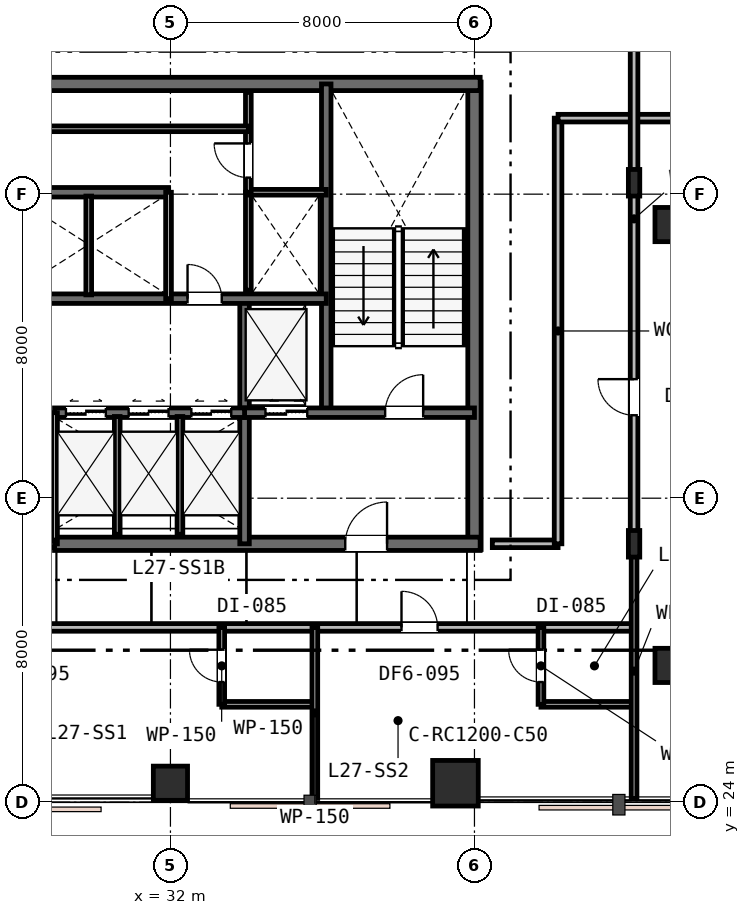
"""IFC4 building model, lengths in metres.
Left out: names, types, materials, properties, quantities, classifications, styles, units other than length and angle.
Written with IfcOpenShell. Run it as: python <this file> out.ifc"""

import sys

from ifc_helpers import new_model, si_unit, direction, frame, frame_2d, origin, origin_2d, place, context, subcontext, project, spatial, rectangle, i_section, extrude, element, fill, save


model = new_model("IFC4")
c1 = context("Model", 3, precision=1e-05, world=origin(), true_north=direction((0.0, 1.0)))
c2 = subcontext(c1, "Body", "Model", "MODEL_VIEW")
j1 = project(units=[si_unit("LENGTHUNIT", "METRE"), si_unit("PLANEANGLEUNIT", "RADIAN")], contexts=[c1])
p1 = place(None, origin())
s1 = spatial("IfcSite", under=j1, at=p1, CompositionType="ELEMENT")
p2 = place(p1, origin())
s2 = spatial("IfcBuilding", under=s1, at=p2, CompositionType="ELEMENT")
p3 = place(p2, frame((0.0, 0.0, 108.0)))
s3 = spatial("IfcBuildingStorey", under=s2, at=p3, CompositionType="ELEMENT", Elevation=108.0)
p4 = place(p3, frame((40.0, 30.65, 0.0), z_axis=(0.0, 0.0, 1.0), x_axis=(0.0, 1.0, 0.0)))
e1 = element("IfcWall", 1, at=p4, inside=s3, PredefinedType="SHEAR", context=c2, shape_type="SweptSolid", body=[
    extrude(rectangle(XDim=12.3, YDim=0.35, at=frame_2d((6.15, 0.0))), origin(), (0.0, 0.0, 1.0), 3.6),
])
p5 = place(p3, frame((15.85, 42.9, 0.0), z_axis=(0.0, 0.0, 1.0), x_axis=(1.0, 0.0, 0.0)))
e2 = element("IfcWall", 2, at=p5, inside=s3, PredefinedType="SHEAR", context=c2, shape_type="SweptSolid", body=[
    extrude(rectangle(XDim=24.3, YDim=0.35, at=frame_2d((12.15, 0.0))), origin(), (0.0, 0.0, 1.0), 3.6),
])
p6 = place(p3, frame((28.95, 30.8, 0.0), z_axis=(0.0, 0.0, 1.0), x_axis=(1.0, 0.0, 0.0)))
e3 = element("IfcWall", 3, at=p6, inside=s3, PredefinedType="SHEAR", context=c2, shape_type="SweptSolid", body=[
    extrude(rectangle(XDim=11.2, YDim=0.35, at=frame_2d((5.6, 0.0))), origin(), (0.0, 0.0, 1.0), 3.6),
])
p7 = place(p6, frame((7.65, 0.0, 0.0)))
e4 = element("IfcOpeningElement", 4, at=p7, cuts=e3, PredefinedType="OPENING", context=c2, shape_type="SweptSolid", body=[
    extrude(rectangle(XDim=1.1, YDim=2.15, at=frame_2d((0.55, 1.075))), frame((0.0, 0.185, 0.0), z_axis=(0.0, -1.0, 0.0), x_axis=(1.0, 0.0, 0.0)), (0.0, 0.0, 1.0), 0.37),
])
p8 = place(p3, frame((36.1, 34.25, 0.0), z_axis=(0.0, 0.0, 1.0), x_axis=(0.0, 1.0, 0.0)))
e5 = element("IfcWall", 5, at=p8, inside=s3, PredefinedType="SHEAR", context=c2, shape_type="SweptSolid", body=[
    extrude(rectangle(XDim=8.65, YDim=0.25, at=frame_2d((4.325, 0.0))), origin(), (0.0, 0.0, 1.0), 3.6),
])
p9 = place(p3, frame((33.95, 30.8, 0.0), z_axis=(0.0, 0.0, 1.0), x_axis=(0.0, 1.0, 0.0)))
e6 = element("IfcWall", 6, at=p9, inside=s3, PredefinedType="SHEAR", context=c2, shape_type="SweptSolid", body=[
    extrude(rectangle(XDim=6.45, YDim=0.25, at=frame_2d((3.225, 0.0))), origin(), (0.0, 0.0, 1.0), 3.6),
])
p10 = place(p3, frame((33.95, 34.25, 0.0), z_axis=(0.0, 0.0, 1.0), x_axis=(1.0, 0.0, 0.0)))
e7 = element("IfcWall", 7, at=p10, inside=s3, PredefinedType="SHEAR", context=c2, shape_type="SweptSolid", body=[
    extrude(rectangle(XDim=6.05, YDim=0.25, at=frame_2d((3.025, 0.0))), origin(), (0.0, 0.0, 1.0), 3.6),
])
p11 = place(p10, frame((3.7, 0.0, 0.0)))
e8 = element("IfcOpeningElement", 8, at=p11, cuts=e7, PredefinedType="OPENING", context=c2, shape_type="SweptSolid", body=[
    extrude(rectangle(XDim=1.0, YDim=2.15, at=frame_2d((0.5, 1.075))), frame((0.0, 0.135, 0.0), z_axis=(0.0, -1.0, 0.0), x_axis=(1.0, 0.0, 0.0)), (0.0, 0.0, 1.0), 0.27),
])
p12 = place(p10, frame((0.55, 0.0, 0.0)))
e9 = element("IfcOpeningElement", 9, at=p12, cuts=e7, PredefinedType="OPENING", context=c2, shape_type="SweptSolid", body=[
    extrude(rectangle(XDim=1.1, YDim=2.15, at=frame_2d((0.55, 1.075))), frame((0.0, 0.135, 0.0), z_axis=(0.0, -1.0, 0.0), x_axis=(1.0, 0.0, 0.0)), (0.0, 0.0, 1.0), 0.27),
])
p13 = place(p3, frame((28.95, 34.25, 0.0), z_axis=(0.0, 0.0, 1.0), x_axis=(1.0, 0.0, 0.0)))
e10 = element("IfcWall", 10, at=p13, inside=s3, PredefinedType="SHEAR", context=c2, shape_type="SweptSolid", body=[
    extrude(rectangle(XDim=5.0, YDim=0.25, at=frame_2d((2.5, 0.0))), origin(), (0.0, 0.0, 1.0), 3.6),
])
p14 = place(p13, frame((0.3, 0.0, 0.0)))
e11 = element("IfcOpeningElement", 11, at=p14, cuts=e10, PredefinedType="OPENING", context=c2, shape_type="SweptSolid", body=[
    extrude(rectangle(XDim=1.05, YDim=2.15, at=frame_2d((0.525, 1.075))), frame((0.0, 0.135, 0.0), z_axis=(0.0, -1.0, 0.0), x_axis=(1.0, 0.0, 0.0)), (0.0, 0.0, 1.0), 0.27),
])
p15 = place(p13, frame((1.95, 0.0, 0.0)))
e12 = element("IfcOpeningElement", 12, at=p15, cuts=e10, PredefinedType="OPENING", context=c2, shape_type="SweptSolid", body=[
    extrude(rectangle(XDim=1.05, YDim=2.15, at=frame_2d((0.525, 1.075))), frame((0.0, 0.135, 0.0), z_axis=(0.0, -1.0, 0.0), x_axis=(1.0, 0.0, 0.0)), (0.0, 0.0, 1.0), 0.27),
])
p16 = place(p13, frame((3.6, 0.0, 0.0)))
e13 = element("IfcOpeningElement", 13, at=p16, cuts=e10, PredefinedType="OPENING", context=c2, shape_type="SweptSolid", body=[
    extrude(rectangle(XDim=1.05, YDim=2.15, at=frame_2d((0.525, 1.075))), frame((0.0, 0.135, 0.0), z_axis=(0.0, -1.0, 0.0), x_axis=(1.0, 0.0, 0.0)), (0.0, 0.0, 1.0), 0.27),
])
p17 = place(p3, frame((19.9, 37.25, 0.0), z_axis=(0.0, 0.0, 1.0), x_axis=(1.0, 0.0, 0.0)))
e14 = element("IfcWall", 14, at=p17, inside=s3, PredefinedType="SHEAR", context=c2, shape_type="SweptSolid", body=[
    extrude(rectangle(XDim=16.2, YDim=0.25, at=frame_2d((8.1, 0.0))), origin(), (0.0, 0.0, 1.0), 3.6),
])
p18 = place(p17, frame((12.55, 0.0, 0.0)))
e15 = element("IfcOpeningElement", 15, at=p18, cuts=e14, PredefinedType="OPENING", context=c2, shape_type="SweptSolid", body=[
    extrude(rectangle(XDim=0.9, YDim=2.15, at=frame_2d((0.45, 1.075))), frame((0.0, 0.135, 0.0), z_axis=(0.0, -1.0, 0.0), x_axis=(1.0, 0.0, 0.0)), (0.0, 0.0, 1.0), 0.27),
])
p19 = place(p3, frame((19.9, 40.05, 0.0), z_axis=(0.0, 0.0, 1.0), x_axis=(1.0, 0.0, 0.0)))
e16 = element("IfcWall", 16, at=p19, inside=s3, PredefinedType="SHEAR", context=c2, shape_type="SweptSolid", body=[
    extrude(rectangle(XDim=12.05, YDim=0.25, at=frame_2d((6.025, 0.0))), origin(), (0.0, 0.0, 1.0), 3.6),
])
p20 = place(p3, frame((32.0, 24.5, 0.0), z_axis=(0.0, 0.0, 1.0), x_axis=(1.0, 0.0, 0.0)))
e17 = element("IfcColumn", 17, at=p20, inside=s3, PredefinedType="COLUMN", context=c2, shape_type="SweptSolid", body=[
    extrude(rectangle(XDim=0.9, YDim=0.9, at=origin_2d()), origin(), (0.0, 0.0, 1.0), 3.6),
])
p21 = place(p3, frame((39.5, 24.5, 0.0), z_axis=(0.0, 0.0, 1.0), x_axis=(1.0, 0.0, 0.0)))
e18 = element("IfcColumn", 18, at=p21, inside=s3, PredefinedType="COLUMN", context=c2, shape_type="SweptSolid", body=[
    extrude(rectangle(XDim=1.2, YDim=1.2, at=origin_2d()), origin(), (0.0, 0.0, 1.0), 3.6),
])
for number, where, z_axis, x_axis in (
    (19, (45.2, 27.6, 0.0), (0.0, 0.0, 1.0), (1.0, 0.0, 0.0)),
    (20, (45.2, 39.2, 0.0), (0.0, 0.0, 1.0), (1.0, 0.0, 0.0)),
):
    element("IfcColumn", number, at=place(p3, frame(where, z_axis=z_axis, x_axis=x_axis)), inside=s3, PredefinedType="COLUMN", context=c2, shape_type="SweptSolid", body=[
        extrude(rectangle(XDim=0.9, YDim=0.9, at=origin_2d()), origin(), (0.0, 0.0, 1.0), 3.6),
    ])
for number, where, z_axis, x_axis in (
    (21, (44.2, 30.8, 0.0), (0.0, 0.0, 1.0), (1.0, 0.0, 0.0)),
    (22, (44.2, 40.3, 0.0), (0.0, 0.0, 1.0), (1.0, 0.0, 0.0)),
):
    element("IfcColumn", number, at=place(p3, frame(where, z_axis=z_axis, x_axis=x_axis)), inside=s3, PredefinedType="COLUMN", context=c2, shape_type="SweptSolid", body=[
        extrude(i_section(OverallWidth=0.3, OverallDepth=0.7, WebThickness=0.017, FlangeThickness=0.032, FilletRadius=0.027, at=origin_2d()), origin(), (0.0, 0.0, 1.0), 3.6),
    ])
p22 = place(p3, frame((28.95, 30.8, 0.0), z_axis=(0.0, 0.0, 1.0), x_axis=(0.0, 1.0, 0.0)))
e23 = element("IfcWall", 23, at=p22, inside=s3, PredefinedType="PLUMBINGWALL", context=c2, shape_type="SweptSolid", body=[
    extrude(rectangle(XDim=3.45, YDim=0.15, at=frame_2d((1.725, 0.0))), origin(), (0.0, 0.0, 1.0), 3.33),
])
p23 = place(p3, frame((27.05, 30.8, 0.0), z_axis=(0.0, 0.0, 1.0), x_axis=(1.0, 0.0, 0.0)))
e24 = element("IfcWall", 24, at=p23, inside=s3, PredefinedType="PARTITIONING", context=c2, shape_type="SweptSolid", body=[
    extrude(rectangle(XDim=1.9, YDim=0.2, at=frame_2d((0.95, 0.0))), origin(), (0.0, 0.0, 1.0), 3.01),
])
p24 = place(p23, frame((0.4, 0.0, 0.0)))
e25 = element("IfcOpeningElement", 25, at=p24, cuts=e24, PredefinedType="OPENING", context=c2, shape_type="SweptSolid", body=[
    extrude(rectangle(XDim=1.1, YDim=2.15, at=frame_2d((0.55, 1.075))), frame((0.0, 0.11, 0.0), z_axis=(0.0, -1.0, 0.0), x_axis=(1.0, 0.0, 0.0)), (0.0, 0.0, 1.0), 0.22),
])
for number, where, z_axis, x_axis in (
    (26, (30.6, 31.05, 0.0), (0.0, 0.0, 1.0), (0.0, 1.0, 0.0)),
    (27, (32.25, 31.05, 0.0), (0.0, 0.0, 1.0), (0.0, 1.0, 0.0)),
):
    element("IfcWall", number, at=place(p3, frame(where, z_axis=z_axis, x_axis=x_axis)), inside=s3, PredefinedType="PLUMBINGWALL", context=c2, shape_type="SweptSolid", body=[
        extrude(rectangle(XDim=3.1, YDim=0.15, at=frame_2d((1.55, 0.0))), origin(), (0.0, 0.0, 1.0), 3.33),
    ])
p25 = place(p3, frame((31.95, 37.25, 0.0), z_axis=(0.0, 0.0, 1.0), x_axis=(0.0, 1.0, 0.0)))
e28 = element("IfcWall", 28, at=p25, inside=s3, PredefinedType="PLUMBINGWALL", context=c2, shape_type="SweptSolid", body=[
    extrude(rectangle(XDim=2.8, YDim=0.15, at=frame_2d((1.4, 0.0))), origin(), (0.0, 0.0, 1.0), 3.33),
])
p26 = place(p3, frame((29.85, 37.35, 0.0), z_axis=(0.0, 0.0, 1.0), x_axis=(0.0, 1.0, 0.0)))
e29 = element("IfcWall", 29, at=p26, inside=s3, PredefinedType="PLUMBINGWALL", context=c2, shape_type="SweptSolid", body=[
    extrude(rectangle(XDim=2.6, YDim=0.15, at=frame_2d((1.3, 0.0))), origin(), (0.0, 0.0, 1.0), 3.33),
])
p27 = place(p3, frame((34.05, 37.473, 0.0), z_axis=(0.0, 0.0, 1.0), x_axis=(0.0, 1.0, 0.0)))
e30 = element("IfcWall", 30, at=p27, inside=s3, PredefinedType="PLUMBINGWALL", context=c2, shape_type="SweptSolid", body=[
    extrude(rectangle(XDim=2.577, YDim=0.15, at=frame_2d((1.288, 0.0))), origin(), (0.0, 0.0, 1.0), 3.33),
])
p28 = place(p3, frame((34.05, 40.05, 0.0), z_axis=(0.0, 0.0, 1.0), x_axis=(1.0, 0.0, 0.0)))
e31 = element("IfcWall", 31, at=p28, inside=s3, PredefinedType="PARTITIONING", context=c2, shape_type="SweptSolid", body=[
    extrude(rectangle(XDim=2.05, YDim=0.15, at=frame_2d((1.025, 0.0))), origin(), (0.0, 0.0, 1.0), 3.33),
])
p29 = place(p3, frame((34.05, 40.05, 0.0), z_axis=(0.0, 0.0, 1.0), x_axis=(0.0, 1.0, 0.0)))
e32 = element("IfcWall", 32, at=p29, inside=s3, PredefinedType="PARTITIONING", context=c2, shape_type="SweptSolid", body=[
    extrude(rectangle(XDim=2.63, YDim=0.15, at=frame_2d((1.315, 0.0))), origin(), (0.0, 0.0, 1.0), 3.33),
])
p30 = place(p29, frame((0.385, 0.0, 0.0)))
e33 = element("IfcOpeningElement", 33, at=p30, cuts=e32, PredefinedType="OPENING", context=c2, shape_type="SweptSolid", body=[
    extrude(rectangle(XDim=0.9, YDim=2.15, at=frame_2d((0.45, 1.075))), frame((0.0, 0.085, 0.0), z_axis=(0.0, -1.0, 0.0), x_axis=(1.0, 0.0, 0.0)), (0.0, 0.0, 1.0), 0.17),
])
p31 = place(p3, frame((22.08, 41.72, 0.0), z_axis=(0.0, 0.0, 1.0), x_axis=(1.0, 0.0, 0.0)))
e34 = element("IfcWall", 34, at=p31, inside=s3, PredefinedType="PARTITIONING", context=c2, shape_type="SweptSolid", body=[
    extrude(rectangle(XDim=11.97, YDim=0.15, at=frame_2d((5.985, 0.0))), origin(), (0.0, 0.0, 1.0), 3.33),
])
p32 = place(p31, frame((5.535, 0.0, 0.0)))
e35 = element("IfcOpeningElement", 35, at=p32, cuts=e34, PredefinedType="OPENING", context=c2, shape_type="SweptSolid", body=[
    extrude(rectangle(XDim=0.9, YDim=2.15, at=frame_2d((0.45, 1.075))), frame((0.0, 0.085, 0.0), z_axis=(0.0, -1.0, 0.0), x_axis=(1.0, 0.0, 0.0)), (0.0, 0.0, 1.0), 0.17),
])
p33 = place(p3, frame((15.4, 28.6, 0.0), z_axis=(0.0, 0.0, 1.0), x_axis=(1.0, 0.0, 0.0)))
e36 = element("IfcWall", 36, at=p33, inside=s3, PredefinedType="PARTITIONING", context=c2, shape_type="SweptSolid", body=[
    extrude(rectangle(XDim=28.8, YDim=0.2, at=frame_2d((14.4, 0.0))), origin(), (0.0, 0.0, 1.0), 2.87),
])
p34 = place(p33, frame((12.41, 0.0, 0.0)))
e37 = element("IfcOpeningElement", 37, at=p34, cuts=e36, PredefinedType="OPENING", context=c2, shape_type="SweptSolid", body=[
    extrude(rectangle(XDim=0.95, YDim=2.15, at=frame_2d((0.475, 1.075))), frame((0.0, 0.11, 0.0), z_axis=(0.0, -1.0, 0.0), x_axis=(1.0, 0.0, 0.0)), (0.0, 0.0, 1.0), 0.22),
])
p35 = place(p33, frame((22.68, 0.0, 0.0)))
e38 = element("IfcOpeningElement", 38, at=p35, cuts=e36, PredefinedType="OPENING", context=c2, shape_type="SweptSolid", body=[
    extrude(rectangle(XDim=0.95, YDim=2.15, at=frame_2d((0.475, 1.075))), frame((0.0, 0.11, 0.0), z_axis=(0.0, -1.0, 0.0), x_axis=(1.0, 0.0, 0.0)), (0.0, 0.0, 1.0), 0.22),
])
p36 = place(p3, frame((40.47, 30.8, 0.0), z_axis=(0.0, 0.0, 1.0), x_axis=(1.0, 0.0, 0.0)))
e39 = element("IfcWall", 39, at=p36, inside=s3, PredefinedType="PARTITIONING", context=c2, shape_type="SweptSolid", body=[
    extrude(rectangle(XDim=1.73, YDim=0.2, at=frame_2d((0.865, 0.0))), origin(), (0.0, 0.0, 1.0), 2.87),
])
p37 = place(p3, frame((42.2, 30.8, 0.0), z_axis=(0.0, 0.0, 1.0), x_axis=(0.0, 1.0, 0.0)))
e40 = element("IfcWall", 40, at=p37, inside=s3, PredefinedType="PARTITIONING", context=c2, shape_type="SweptSolid", body=[
    extrude(rectangle(XDim=11.2, YDim=0.2, at=frame_2d((5.6, 0.0))), origin(), (0.0, 0.0, 1.0), 2.87),
])
p38 = place(p3, frame((42.2, 42.0, 0.0), z_axis=(0.0, 0.0, 1.0), x_axis=(1.0, 0.0, 0.0)))
e41 = element("IfcWall", 41, at=p38, inside=s3, PredefinedType="PARTITIONING", context=c2, shape_type="SweptSolid", body=[
    extrude(rectangle(XDim=8.7, YDim=0.2, at=frame_2d((4.35, 0.0))), origin(), (0.0, 0.0, 1.0), 3.33),
])
p39 = place(p3, frame((33.35, 26.576, 0.0), z_axis=(0.0, 0.0, 1.0), x_axis=(1.0, 0.0, 0.0)))
e42 = element("IfcWall", 42, at=p39, inside=s3, PredefinedType="PARTITIONING", context=c2, shape_type="SweptSolid", body=[
    extrude(rectangle(XDim=2.45, YDim=0.15, at=frame_2d((1.225, 0.0))), origin(), (0.0, 0.0, 1.0), 3.01),
])
p40 = place(p3, frame((33.35, 26.576, 0.0), z_axis=(0.0, 0.0, 1.0), x_axis=(0.0, 1.0, 0.0)))
e43 = element("IfcWall", 43, at=p40, inside=s3, PredefinedType="PARTITIONING", context=c2, shape_type="SweptSolid", body=[
    extrude(rectangle(XDim=2.024, YDim=0.15, at=frame_2d((1.012, 0.0))), origin(), (0.0, 0.0, 1.0), 3.33),
])
p41 = place(p40, frame((0.587, 0.0, 0.0)))
e44 = element("IfcOpeningElement", 44, at=p41, cuts=e43, PredefinedType="OPENING", context=c2, shape_type="SweptSolid", body=[
    extrude(rectangle(XDim=0.85, YDim=2.15, at=frame_2d((0.425, 1.075))), frame((0.0, 0.085, 0.0), z_axis=(0.0, -1.0, 0.0), x_axis=(1.0, 0.0, 0.0)), (0.0, 0.0, 1.0), 0.17),
])
p42 = place(p3, frame((35.8, 28.6, 0.0), z_axis=(0.0, 0.0, 1.0), x_axis=(0.0, -1.0, 0.0)))
e45 = element("IfcWall", 45, at=p42, inside=s3, PredefinedType="PARTITIONING", context=c2, shape_type="SweptSolid", body=[
    extrude(rectangle(XDim=4.5, YDim=0.15, at=frame_2d((2.25, 0.0))), origin(), (0.0, 0.0, 1.0), 2.96),
])
p43 = place(p3, frame((41.75, 26.576, 0.0), z_axis=(0.0, 0.0, 1.0), x_axis=(1.0, 0.0, 0.0)))
e46 = element("IfcWall", 46, at=p43, inside=s3, PredefinedType="PARTITIONING", context=c2, shape_type="SweptSolid", body=[
    extrude(rectangle(XDim=2.45, YDim=0.15, at=frame_2d((1.225, 0.0))), origin(), (0.0, 0.0, 1.0), 3.33),
])
p44 = place(p3, frame((41.75, 26.576, 0.0), z_axis=(0.0, 0.0, 1.0), x_axis=(0.0, 1.0, 0.0)))
e47 = element("IfcWall", 47, at=p44, inside=s3, PredefinedType="PARTITIONING", context=c2, shape_type="SweptSolid", body=[
    extrude(rectangle(XDim=2.024, YDim=0.15, at=frame_2d((1.012, 0.0))), origin(), (0.0, 0.0, 1.0), 3.33),
])
p45 = place(p44, frame((0.587, 0.0, 0.0)))
e48 = element("IfcOpeningElement", 48, at=p45, cuts=e47, PredefinedType="OPENING", context=c2, shape_type="SweptSolid", body=[
    extrude(rectangle(XDim=0.85, YDim=2.15, at=frame_2d((0.425, 1.075))), frame((0.0, 0.085, 0.0), z_axis=(0.0, -1.0, 0.0), x_axis=(1.0, 0.0, 0.0)), (0.0, 0.0, 1.0), 0.17),
])
p46 = place(p3, frame((44.2, 30.8, 0.0), z_axis=(0.0, 0.0, 1.0), x_axis=(0.0, -1.0, 0.0)))
e49 = element("IfcWall", 49, at=p46, inside=s3, PredefinedType="PARTITIONING", context=c2, shape_type="SweptSolid", body=[
    extrude(rectangle(XDim=6.7, YDim=0.15, at=frame_2d((3.35, 0.0))), origin(), (0.0, 0.0, 1.0), 2.87),
])
p47 = place(p3, frame((44.2, 30.8, 0.0), z_axis=(0.0, 0.0, 1.0), x_axis=(0.0, 1.0, 0.0)))
e50 = element("IfcWall", 50, at=p47, inside=s3, PredefinedType="PARTITIONING", context=c2, shape_type="SweptSolid", body=[
    extrude(rectangle(XDim=17.1, YDim=0.2, at=frame_2d((8.55, 0.0))), origin(), (0.0, 0.0, 1.0), 2.87),
])
p48 = place(p47, frame((3.382, 0.0, 0.0)))
e51 = element("IfcOpeningElement", 51, at=p48, cuts=e50, PredefinedType="OPENING", context=c2, shape_type="SweptSolid", body=[
    extrude(rectangle(XDim=0.95, YDim=2.15, at=frame_2d((0.475, 1.075))), frame((0.0, 0.11, 0.0), z_axis=(0.0, -1.0, 0.0), x_axis=(1.0, 0.0, 0.0)), (0.0, 0.0, 1.0), 0.22),
])
p49 = place(p11, origin())
e52 = element("IfcDoor", 52, at=p49, inside=s3, OperationType="SINGLE_SWING_RIGHT", PredefinedType="DOOR", context=c2, shape_type="SweptSolid", body=[
    extrude(rectangle(XDim=1.0, YDim=2.15, at=frame_2d((0.5, 1.075))), frame((0.0, 0.025, 0.0), z_axis=(0.0, -1.0, 0.0), x_axis=(1.0, 0.0, 0.0)), (0.0, 0.0, 1.0), 0.05),
])
fill(e8, e52)
p50 = place(p7, origin())
e53 = element("IfcDoor", 53, at=p50, inside=s3, OperationType="SINGLE_SWING_RIGHT", PredefinedType="DOOR", context=c2, shape_type="SweptSolid", body=[
    extrude(rectangle(XDim=1.1, YDim=2.15, at=frame_2d((0.55, 1.075))), frame((0.0, 0.025, 0.0), z_axis=(0.0, -1.0, 0.0), x_axis=(1.0, 0.0, 0.0)), (0.0, 0.0, 1.0), 0.05),
])
fill(e4, e53)
p51 = place(p18, origin())
e54 = element("IfcDoor", 54, at=p51, inside=s3, OperationType="SINGLE_SWING_LEFT", PredefinedType="DOOR", context=c2, shape_type="SweptSolid", body=[
    extrude(rectangle(XDim=0.9, YDim=2.15, at=frame_2d((0.45, 1.075))), frame((0.0, 0.025, 0.0), z_axis=(0.0, -1.0, 0.0), x_axis=(1.0, 0.0, 0.0)), (0.0, 0.0, 1.0), 0.05),
])
fill(e15, e54)
p52 = place(p30, origin())
e55 = element("IfcDoor", 55, at=p52, inside=s3, OperationType="SINGLE_SWING_RIGHT", PredefinedType="DOOR", context=c2, shape_type="SweptSolid", body=[
    extrude(rectangle(XDim=0.9, YDim=2.15, at=frame_2d((0.45, 1.075))), frame((0.0, 0.025, 0.0), z_axis=(0.0, -1.0, 0.0), x_axis=(1.0, 0.0, 0.0)), (0.0, 0.0, 1.0), 0.05),
])
fill(e33, e55)
p53 = place(p41, origin())
e56 = element("IfcDoor", 56, at=p53, inside=s3, OperationType="SINGLE_SWING_RIGHT", PredefinedType="DOOR", context=c2, shape_type="SweptSolid", body=[
    extrude(rectangle(XDim=0.85, YDim=2.15, at=frame_2d((0.425, 1.075))), frame((0.0, 0.025, 0.0), z_axis=(0.0, -1.0, 0.0), x_axis=(1.0, 0.0, 0.0)), (0.0, 0.0, 1.0), 0.05),
])
fill(e44, e56)
p54 = place(p35, origin())
e57 = element("IfcDoor", 57, at=p54, inside=s3, OperationType="SINGLE_SWING_LEFT", PredefinedType="DOOR", context=c2, shape_type="SweptSolid", body=[
    extrude(rectangle(XDim=0.95, YDim=2.15, at=frame_2d((0.475, 1.075))), frame((0.0, 0.025, 0.0), z_axis=(0.0, -1.0, 0.0), x_axis=(1.0, 0.0, 0.0)), (0.0, 0.0, 1.0), 0.05),
])
fill(e38, e57)
p55 = place(p45, origin())
e58 = element("IfcDoor", 58, at=p55, inside=s3, OperationType="SINGLE_SWING_RIGHT", PredefinedType="DOOR", context=c2, shape_type="SweptSolid", body=[
    extrude(rectangle(XDim=0.85, YDim=2.15, at=frame_2d((0.425, 1.075))), frame((0.0, 0.025, 0.0), z_axis=(0.0, -1.0, 0.0), x_axis=(1.0, 0.0, 0.0)), (0.0, 0.0, 1.0), 0.05),
])
fill(e48, e58)
p56 = place(p48, origin())
e59 = element("IfcDoor", 59, at=p56, inside=s3, OperationType="SINGLE_SWING_RIGHT", PredefinedType="DOOR", context=c2, shape_type="SweptSolid", body=[
    extrude(rectangle(XDim=0.95, YDim=2.15, at=frame_2d((0.475, 1.075))), frame((0.0, 0.025, 0.0), z_axis=(0.0, -1.0, 0.0), x_axis=(1.0, 0.0, 0.0)), (0.0, 0.0, 1.0), 0.05),
])
fill(e51, e59)
p57 = place(p12, origin())
e60 = element("IfcDoor", 60, at=p57, inside=s3, OperationType="DOUBLE_DOOR_SLIDING", PredefinedType="DOOR", context=c2, shape_type="SweptSolid", body=[
    extrude(rectangle(XDim=1.1, YDim=2.15, at=frame_2d((0.55, 1.075))), frame((0.0, 0.025, 0.0), z_axis=(0.0, -1.0, 0.0), x_axis=(1.0, 0.0, 0.0)), (0.0, 0.0, 1.0), 0.05),
])
fill(e9, e60)
p58 = place(p14, origin())
e61 = element("IfcDoor", 61, at=p58, inside=s3, OperationType="DOUBLE_DOOR_SLIDING", PredefinedType="DOOR", context=c2, shape_type="SweptSolid", body=[
    extrude(rectangle(XDim=1.05, YDim=2.15, at=frame_2d((0.525, 1.075))), frame((0.0, 0.025, 0.0), z_axis=(0.0, -1.0, 0.0), x_axis=(1.0, 0.0, 0.0)), (0.0, 0.0, 1.0), 0.05),
])
fill(e11, e61)
p59 = place(p15, origin())
e62 = element("IfcDoor", 62, at=p59, inside=s3, OperationType="DOUBLE_DOOR_SLIDING", PredefinedType="DOOR", context=c2, shape_type="SweptSolid", body=[
    extrude(rectangle(XDim=1.05, YDim=2.15, at=frame_2d((0.525, 1.075))), frame((0.0, 0.025, 0.0), z_axis=(0.0, -1.0, 0.0), x_axis=(1.0, 0.0, 0.0)), (0.0, 0.0, 1.0), 0.05),
])
fill(e12, e62)
p60 = place(p16, origin())
e63 = element("IfcDoor", 63, at=p60, inside=s3, OperationType="DOUBLE_DOOR_SLIDING", PredefinedType="DOOR", context=c2, shape_type="SweptSolid", body=[
    extrude(rectangle(XDim=1.05, YDim=2.15, at=frame_2d((0.525, 1.075))), frame((0.0, 0.025, 0.0), z_axis=(0.0, -1.0, 0.0), x_axis=(1.0, 0.0, 0.0)), (0.0, 0.0, 1.0), 0.05),
])
fill(e13, e63)
save(model, sys.argv[1])
